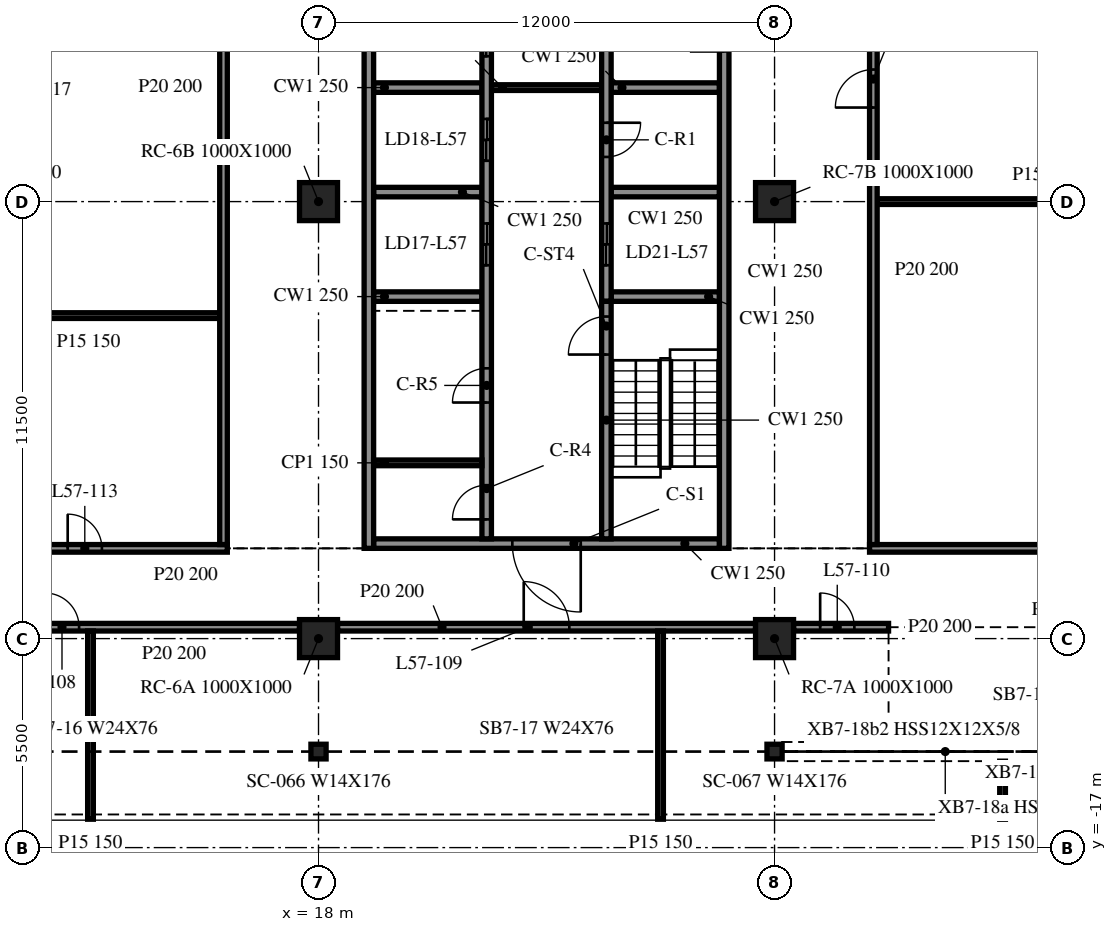
"""IFC4 building model, lengths in metres.
Left out: names, types, materials, properties, quantities, classifications, styles, units other than length and angle.
Written with IfcOpenShell. Run it as: python <this file> out.ifc"""

import sys

from ifc_helpers import new_model, si_unit, direction, frame, frame_2d, origin, origin_2d, place, context, subcontext, project, spatial, rectangle, i_section, extrude, element, fill, save


model = new_model("IFC4")
c1 = context("Model", 3, precision=1e-05, world=origin(), true_north=direction((0.0, 1.0)))
c2 = subcontext(c1, "Body", "Model", "MODEL_VIEW")
j1 = project(units=[si_unit("LENGTHUNIT", "METRE"), si_unit("PLANEANGLEUNIT", "RADIAN")], contexts=[c1])
p1 = place(None, origin())
s1 = spatial("IfcSite", under=j1, at=p1, CompositionType="ELEMENT")
p2 = place(p1, origin())
s2 = spatial("IfcBuilding", under=s1, at=p2, CompositionType="ELEMENT")
p3 = place(p2, frame((0.0, 0.0, 236.2)))
s3 = spatial("IfcBuildingStorey", under=s2, at=p3, CompositionType="ELEMENT", Elevation=236.2)
for number, where, z_axis, x_axis in (
    (1, (18.0, -11.5, -0.34), (0.0, 0.0, 1.0), (1.0, 0.0, 0.0)),
    (2, (18.0, 0.0, -0.34), (0.0, 0.0, 1.0), (1.0, 0.0, 0.0)),
    (3, (30.0, -11.5, -0.34), (0.0, 0.0, 1.0), (1.0, 0.0, 0.0)),
    (4, (30.0, 0.0, -0.34), (0.0, 0.0, 1.0), (1.0, 0.0, 0.0)),
):
    element("IfcColumn", number, at=place(p3, frame(where, z_axis=z_axis, x_axis=x_axis)), inside=s3, PredefinedType="COLUMN", context=c2, shape_type="SweptSolid", body=[
        extrude(rectangle(XDim=1.0, YDim=1.0, at=origin_2d()), origin(), (0.0, 0.0, 1.0), 3.8),
    ])
for number, where, z_axis, x_axis in (
    (5, (18.0, -14.473, -0.34), (0.0, 0.0, 1.0), (1.0, 0.0, 0.0)),
    (6, (30.0, -14.473, -0.34), (0.0, 0.0, 1.0), (1.0, 0.0, 0.0)),
):
    element("IfcColumn", number, at=place(p3, frame(where, z_axis=z_axis, x_axis=x_axis)), inside=s3, PredefinedType="COLUMN", context=c2, shape_type="SweptSolid", body=[
        extrude(i_section(OverallWidth=0.399, OverallDepth=0.386, WebThickness=0.021, FlangeThickness=0.033, at=origin_2d()), origin(), (0.0, 0.0, 1.0), 3.8),
    ])
p4 = place(p3, frame((19.325, 15.125, 0.0), z_axis=(0.0, 0.0, 1.0), x_axis=(0.0, -1.0, 0.0)))
e7 = element("IfcWall", 7, at=p4, inside=s3, PredefinedType="SOLIDWALL", context=c2, shape_type="SweptSolid", body=[
    extrude(rectangle(XDim=24.25, YDim=0.25, at=frame_2d((12.125, 0.0))), origin(), (0.0, 0.0, 1.0), 3.46),
])
p5 = place(p3, frame((28.675, -9.125, 0.0), z_axis=(0.0, 0.0, 1.0), x_axis=(0.0, 1.0, 0.0)))
e8 = element("IfcWall", 8, at=p5, inside=s3, PredefinedType="SOLIDWALL", context=c2, shape_type="SweptSolid", body=[
    extrude(rectangle(XDim=24.25, YDim=0.25, at=frame_2d((12.125, 0.0))), origin(), (0.0, 0.0, 1.0), 3.46),
])
p6 = place(p5, frame((13.075, 0.0, 0.0)))
e9 = element("IfcOpeningElement", 9, at=p6, cuts=e8, PredefinedType="OPENING", context=c2, shape_type="SweptSolid", body=[
    extrude(rectangle(XDim=0.9, YDim=2.1, at=frame_2d((0.45, 1.05))), frame((0.0, 0.135, 0.0), z_axis=(0.0, -1.0, 0.0), x_axis=(1.0, 0.0, 0.0)), (0.0, 0.0, 1.0), 0.27),
])
p7 = place(p5, frame((15.775, 0.0, 0.0)))
e10 = element("IfcOpeningElement", 10, at=p7, cuts=e8, PredefinedType="OPENING", context=c2, shape_type="SweptSolid", body=[
    extrude(rectangle(XDim=0.9, YDim=2.1, at=frame_2d((0.45, 1.05))), frame((0.0, 0.135, 0.0), z_axis=(0.0, -1.0, 0.0), x_axis=(1.0, 0.0, 0.0)), (0.0, 0.0, 1.0), 0.27),
])
p8 = place(p5, frame((19.225, 0.0, 0.0)))
e11 = element("IfcOpeningElement", 11, at=p8, cuts=e8, PredefinedType="OPENING", context=c2, shape_type="SweptSolid", body=[
    extrude(rectangle(XDim=0.9, YDim=2.1, at=frame_2d((0.45, 1.05))), frame((0.0, 0.135, 0.0), z_axis=(0.0, -1.0, 0.0), x_axis=(1.0, 0.0, 0.0)), (0.0, 0.0, 1.0), 0.27),
])
p9 = place(p5, frame((22.587, 0.0, 0.0)))
e12 = element("IfcOpeningElement", 12, at=p9, cuts=e8, PredefinedType="OPENING", context=c2, shape_type="SweptSolid", body=[
    extrude(rectangle(XDim=0.9, YDim=2.1, at=frame_2d((0.45, 1.05))), frame((0.0, 0.135, 0.0), z_axis=(0.0, -1.0, 0.0), x_axis=(1.0, 0.0, 0.0)), (0.0, 0.0, 1.0), 0.27),
])
p10 = place(p3, frame((28.55, -9.0, 0.0), z_axis=(0.0, 0.0, 1.0), x_axis=(-1.0, 0.0, 0.0)))
e13 = element("IfcWall", 13, at=p10, inside=s3, PredefinedType="SOLIDWALL", context=c2, shape_type="SweptSolid", body=[
    extrude(rectangle(XDim=9.1, YDim=0.25, at=frame_2d((4.55, 0.0))), origin(), (0.0, 0.0, 1.0), 3.46),
])
p11 = place(p10, frame((3.65, 0.0, 0.0)))
e14 = element("IfcOpeningElement", 14, at=p11, cuts=e13, PredefinedType="OPENING", context=c2, shape_type="SweptSolid", body=[
    extrude(rectangle(XDim=1.8, YDim=2.1, at=frame_2d((0.9, 1.05))), frame((0.0, 0.135, 0.0), z_axis=(0.0, -1.0, 0.0), x_axis=(1.0, 0.0, 0.0)), (0.0, 0.0, 1.0), 0.27),
])
p12 = place(p3, frame((22.425, -8.875, 0.0), z_axis=(0.0, 0.0, 1.0), x_axis=(0.0, 1.0, 0.0)))
e15 = element("IfcWall", 15, at=p12, inside=s3, PredefinedType="SOLIDWALL", context=c2, shape_type="SweptSolid", body=[
    extrude(rectangle(XDim=17.5, YDim=0.25, at=frame_2d((8.75, 0.0))), origin(), (0.0, 0.0, 1.0), 3.46),
])
p13 = place(p12, frame((7.2, 0.0, 0.0)))
e16 = element("IfcOpeningElement", 16, at=p13, cuts=e15, PredefinedType="OPENING", context=c2, shape_type="SweptSolid", body=[
    extrude(rectangle(XDim=1.1, YDim=2.1, at=frame_2d((0.55, 1.05))), frame((0.0, 0.135, 0.0), z_axis=(0.0, -1.0, 0.0), x_axis=(1.0, 0.0, 0.0)), (0.0, 0.0, 1.0), 0.27),
])
p14 = place(p12, frame((9.95, 0.0, 0.0)))
e17 = element("IfcOpeningElement", 17, at=p14, cuts=e15, PredefinedType="OPENING", context=c2, shape_type="SweptSolid", body=[
    extrude(rectangle(XDim=1.1, YDim=2.1, at=frame_2d((0.55, 1.05))), frame((0.0, 0.135, 0.0), z_axis=(0.0, -1.0, 0.0), x_axis=(1.0, 0.0, 0.0)), (0.0, 0.0, 1.0), 0.27),
])
p15 = place(p12, frame((12.7, 0.0, 0.0)))
e18 = element("IfcOpeningElement", 18, at=p15, cuts=e15, PredefinedType="OPENING", context=c2, shape_type="SweptSolid", body=[
    extrude(rectangle(XDim=1.1, YDim=2.1, at=frame_2d((0.55, 1.05))), frame((0.0, 0.135, 0.0), z_axis=(0.0, -1.0, 0.0), x_axis=(1.0, 0.0, 0.0)), (0.0, 0.0, 1.0), 0.27),
])
p16 = place(p12, frame((15.45, 0.0, 0.0)))
e19 = element("IfcOpeningElement", 19, at=p16, cuts=e15, PredefinedType="OPENING", context=c2, shape_type="SweptSolid", body=[
    extrude(rectangle(XDim=1.1, YDim=2.1, at=frame_2d((0.55, 1.05))), frame((0.0, 0.135, 0.0), z_axis=(0.0, -1.0, 0.0), x_axis=(1.0, 0.0, 0.0)), (0.0, 0.0, 1.0), 0.27),
])
p17 = place(p12, frame((0.512, 0.0, 0.0)))
e20 = element("IfcOpeningElement", 20, at=p17, cuts=e15, PredefinedType="OPENING", context=c2, shape_type="SweptSolid", body=[
    extrude(rectangle(XDim=0.9, YDim=2.1, at=frame_2d((0.45, 1.05))), frame((0.0, 0.135, 0.0), z_axis=(0.0, -1.0, 0.0), x_axis=(1.0, 0.0, 0.0)), (0.0, 0.0, 1.0), 0.27),
])
p18 = place(p12, frame((3.587, 0.0, 0.0)))
e21 = element("IfcOpeningElement", 21, at=p18, cuts=e15, PredefinedType="OPENING", context=c2, shape_type="SweptSolid", body=[
    extrude(rectangle(XDim=0.9, YDim=2.1, at=frame_2d((0.45, 1.05))), frame((0.0, 0.135, 0.0), z_axis=(0.0, -1.0, 0.0), x_axis=(1.0, 0.0, 0.0)), (0.0, 0.0, 1.0), 0.27),
])
p19 = place(p3, frame((25.575, -8.875, 0.0), z_axis=(0.0, 0.0, 1.0), x_axis=(0.0, 1.0, 0.0)))
e22 = element("IfcWall", 22, at=p19, inside=s3, PredefinedType="SOLIDWALL", context=c2, shape_type="SweptSolid", body=[
    extrude(rectangle(XDim=6.25, YDim=0.25, at=frame_2d((3.125, 0.0))), origin(), (0.0, 0.0, 1.0), 3.46),
])
p20 = place(p19, frame((4.85, 0.0, 0.0)))
e23 = element("IfcOpeningElement", 23, at=p20, cuts=e22, PredefinedType="OPENING", context=c2, shape_type="SweptSolid", body=[
    extrude(rectangle(XDim=1.0, YDim=2.1, at=frame_2d((0.5, 1.05))), frame((0.0, 0.135, 0.0), z_axis=(0.0, -1.0, 0.0), x_axis=(1.0, 0.0, 0.0)), (0.0, 0.0, 1.0), 0.27),
])
p21 = place(p3, frame((25.575, 14.875, 0.0), z_axis=(0.0, 0.0, 1.0), x_axis=(0.0, -1.0, 0.0)))
e24 = element("IfcWall", 24, at=p21, inside=s3, PredefinedType="SOLIDWALL", context=c2, shape_type="SweptSolid", body=[
    extrude(rectangle(XDim=17.5, YDim=0.25, at=frame_2d((8.75, 0.0))), origin(), (0.0, 0.0, 1.0), 3.46),
])
p22 = place(p21, frame((15.45, 0.0, 0.0)))
e25 = element("IfcOpeningElement", 25, at=p22, cuts=e24, PredefinedType="OPENING", context=c2, shape_type="SweptSolid", body=[
    extrude(rectangle(XDim=1.1, YDim=2.1, at=frame_2d((0.55, 1.05))), frame((0.0, 0.135, 0.0), z_axis=(0.0, -1.0, 0.0), x_axis=(1.0, 0.0, 0.0)), (0.0, 0.0, 1.0), 0.27),
])
p23 = place(p21, frame((12.8, 0.0, 0.0)))
e26 = element("IfcOpeningElement", 26, at=p23, cuts=e24, PredefinedType="OPENING", context=c2, shape_type="SweptSolid", body=[
    extrude(rectangle(XDim=0.9, YDim=2.1, at=frame_2d((0.45, 1.05))), frame((0.0, 0.135, 0.0), z_axis=(0.0, -1.0, 0.0), x_axis=(1.0, 0.0, 0.0)), (0.0, 0.0, 1.0), 0.27),
])
for number, where, z_axis, x_axis in (
    (27, (19.45, -2.5, 0.0), (0.0, 0.0, 1.0), (1.0, 0.0, 0.0)),
    (28, (19.45, 0.25, 0.0), (0.0, 0.0, 1.0), (1.0, 0.0, 0.0)),
    (29, (19.45, 3.0, 0.0), (0.0, 0.0, 1.0), (1.0, 0.0, 0.0)),
    (30, (25.7, -2.5, 0.0), (0.0, 0.0, 1.0), (1.0, 0.0, 0.0)),
    (31, (25.7, 0.25, 0.0), (0.0, 0.0, 1.0), (1.0, 0.0, 0.0)),
    (32, (25.7, 3.0, 0.0), (0.0, 0.0, 1.0), (1.0, 0.0, 0.0)),
):
    element("IfcWall", number, at=place(p3, frame(where, z_axis=z_axis, x_axis=x_axis)), inside=s3, PredefinedType="SOLIDWALL", context=c2, shape_type="SweptSolid", body=[
        extrude(rectangle(XDim=2.85, YDim=0.25, at=frame_2d((1.425, 0.0))), origin(), (0.0, 0.0, 1.0), 3.46),
    ])
p24 = place(p3, frame((22.55, 3.0, 0.0), z_axis=(0.0, 0.0, 1.0), x_axis=(1.0, 0.0, 0.0)))
e33 = element("IfcWall", 33, at=p24, inside=s3, PredefinedType="PARTITIONING", context=c2, shape_type="SweptSolid", body=[
    extrude(rectangle(XDim=2.9, YDim=0.15, at=frame_2d((1.45, 0.0))), origin(), (0.0, 0.0, 1.0), 3.46),
])
p25 = place(p3, frame((19.45, -6.875, 0.0), z_axis=(0.0, 0.0, 1.0), x_axis=(1.0, 0.0, 0.0)))
e34 = element("IfcWall", 34, at=p25, inside=s3, PredefinedType="PARTITIONING", context=c2, shape_type="SweptSolid", body=[
    extrude(rectangle(XDim=2.85, YDim=0.15, at=frame_2d((1.425, 0.0))), origin(), (0.0, 0.0, 1.0), 3.46),
])
p26 = place(p3, frame((6.5, -11.2, 0.0), z_axis=(0.0, 0.0, 1.0), x_axis=(1.0, 0.0, 0.0)))
e35 = element("IfcWall", 35, at=p26, inside=s3, PredefinedType="PARTITIONING", context=c2, shape_type="SweptSolid", body=[
    extrude(rectangle(XDim=11.0, YDim=0.2, at=frame_2d((5.5, 0.0))), origin(), (0.0, 0.0, 1.0), 3.46),
])
p27 = place(p26, frame((1.3, 0.0, 0.0)))
e36 = element("IfcOpeningElement", 36, at=p27, cuts=e35, PredefinedType="OPENING", context=c2, shape_type="SweptSolid", body=[
    extrude(rectangle(XDim=0.9, YDim=2.1, at=frame_2d((0.45, 1.05))), frame((0.0, 0.11, 0.0), z_axis=(0.0, -1.0, 0.0), x_axis=(1.0, 0.0, 0.0)), (0.0, 0.0, 1.0), 0.22),
])
p28 = place(p26, frame((4.3, 0.0, 0.0)))
e37 = element("IfcOpeningElement", 37, at=p28, cuts=e35, PredefinedType="OPENING", context=c2, shape_type="SweptSolid", body=[
    extrude(rectangle(XDim=0.9, YDim=2.1, at=frame_2d((0.45, 1.05))), frame((0.0, 0.11, 0.0), z_axis=(0.0, -1.0, 0.0), x_axis=(1.0, 0.0, 0.0)), (0.0, 0.0, 1.0), 0.22),
])
p29 = place(p3, frame((18.5, -11.2, 0.0), z_axis=(0.0, 0.0, 1.0), x_axis=(1.0, 0.0, 0.0)))
e38 = element("IfcWall", 38, at=p29, inside=s3, PredefinedType="PARTITIONING", context=c2, shape_type="SweptSolid", body=[
    extrude(rectangle(XDim=11.0, YDim=0.2, at=frame_2d((5.5, 0.0))), origin(), (0.0, 0.0, 1.0), 3.46),
])
p30 = place(p29, frame((4.9, 0.0, 0.0)))
e39 = element("IfcOpeningElement", 39, at=p30, cuts=e38, PredefinedType="OPENING", context=c2, shape_type="SweptSolid", body=[
    extrude(rectangle(XDim=1.2, YDim=2.1, at=frame_2d((0.6, 1.05))), frame((0.0, 0.11, 0.0), z_axis=(0.0, -1.0, 0.0), x_axis=(1.0, 0.0, 0.0)), (0.0, 0.0, 1.0), 0.22),
])
p31 = place(p3, frame((30.5, -11.2, 0.0), z_axis=(0.0, 0.0, 1.0), x_axis=(1.0, 0.0, 0.0)))
e40 = element("IfcWall", 40, at=p31, inside=s3, PredefinedType="PARTITIONING", context=c2, shape_type="SweptSolid", body=[
    extrude(rectangle(XDim=2.5, YDim=0.2, at=frame_2d((1.25, 0.0))), origin(), (0.0, 0.0, 1.0), 3.46),
])
p32 = place(p31, frame((0.7, 0.0, 0.0)))
e41 = element("IfcOpeningElement", 41, at=p32, cuts=e40, PredefinedType="OPENING", context=c2, shape_type="SweptSolid", body=[
    extrude(rectangle(XDim=0.9, YDim=2.1, at=frame_2d((0.45, 1.05))), frame((0.0, 0.11, 0.0), z_axis=(0.0, -1.0, 0.0), x_axis=(1.0, 0.0, 0.0)), (0.0, 0.0, 1.0), 0.22),
])
p33 = place(p3, frame((8.3, -9.125, 0.0), z_axis=(0.0, 0.0, 1.0), x_axis=(1.0, 0.0, 0.0)))
e42 = element("IfcWall", 42, at=p33, inside=s3, PredefinedType="PARTITIONING", context=c2, shape_type="SweptSolid", body=[
    extrude(rectangle(XDim=7.3, YDim=0.2, at=frame_2d((3.65, 0.0))), origin(), (0.0, 0.0, 1.0), 3.46),
])
p34 = place(p33, frame((3.1, 0.0, 0.0)))
e43 = element("IfcOpeningElement", 43, at=p34, cuts=e42, PredefinedType="OPENING", context=c2, shape_type="SweptSolid", body=[
    extrude(rectangle(XDim=0.9, YDim=2.1, at=frame_2d((0.45, 1.05))), frame((0.0, 0.11, 0.0), z_axis=(0.0, -1.0, 0.0), x_axis=(1.0, 0.0, 0.0)), (0.0, 0.0, 1.0), 0.22),
])
p35 = place(p3, frame((32.5, -9.125, 0.0), z_axis=(0.0, 0.0, 1.0), x_axis=(1.0, 0.0, 0.0)))
e44 = element("IfcWall", 44, at=p35, inside=s3, PredefinedType="PARTITIONING", context=c2, shape_type="SweptSolid", body=[
    extrude(rectangle(XDim=21.475, YDim=0.2, at=frame_2d((10.738, 0.0))), origin(), (0.0, 0.0, 1.0), 3.46),
])
p36 = place(p35, frame((10.1, 0.0, 0.0)))
e45 = element("IfcOpeningElement", 45, at=p36, cuts=e44, PredefinedType="OPENING", context=c2, shape_type="SweptSolid", body=[
    extrude(rectangle(XDim=1.0, YDim=2.1, at=frame_2d((0.5, 1.05))), frame((0.0, 0.11, 0.0), z_axis=(0.0, -1.0, 0.0), x_axis=(1.0, 0.0, 0.0)), (0.0, 0.0, 1.0), 0.22),
])
p37 = place(p3, frame((8.5, -3.0, 0.0), z_axis=(0.0, 0.0, 1.0), x_axis=(1.0, 0.0, 0.0)))
e46 = element("IfcWall", 46, at=p37, inside=s3, PredefinedType="PARTITIONING", context=c2, shape_type="SweptSolid", body=[
    extrude(rectangle(XDim=6.9, YDim=0.15, at=frame_2d((3.45, 0.0))), origin(), (0.0, 0.0, 1.0), 3.46),
])
p38 = place(p3, frame((32.7, 0.0, 0.0), z_axis=(0.0, 0.0, 1.0), x_axis=(1.0, 0.0, 0.0)))
e47 = element("IfcWall", 47, at=p38, inside=s3, PredefinedType="PARTITIONING", context=c2, shape_type="SweptSolid", body=[
    extrude(rectangle(XDim=8.8, YDim=0.15, at=frame_2d((4.4, 0.0))), origin(), (0.0, 0.0, 1.0), 3.46),
])
p39 = place(p3, frame((12.0, -16.253, 0.0), z_axis=(0.0, 0.0, 1.0), x_axis=(0.0, 1.0, 0.0)))
e48 = element("IfcWall", 48, at=p39, inside=s3, PredefinedType="PARTITIONING", context=c2, shape_type="SweptSolid", body=[
    extrude(rectangle(XDim=4.953, YDim=0.15, at=frame_2d((2.477, 0.0))), origin(), (0.0, 0.0, 1.0), 3.46),
])
p40 = place(p3, frame((15.5, -9.025, 0.0), z_axis=(0.0, 0.0, 1.0), x_axis=(0.0, 1.0, 0.0)))
e49 = element("IfcWall", 49, at=p40, inside=s3, PredefinedType="PARTITIONING", context=c2, shape_type="SweptSolid", body=[
    extrude(rectangle(XDim=24.05, YDim=0.2, at=frame_2d((12.025, 0.0))), origin(), (0.0, 0.0, 1.0), 3.46),
])
p41 = place(p3, frame((27.0, -16.253, 0.0), z_axis=(0.0, 0.0, 1.0), x_axis=(0.0, 1.0, 0.0)))
e50 = element("IfcWall", 50, at=p41, inside=s3, PredefinedType="PARTITIONING", context=c2, shape_type="SweptSolid", body=[
    extrude(rectangle(XDim=4.953, YDim=0.15, at=frame_2d((2.477, 0.0))), origin(), (0.0, 0.0, 1.0), 3.46),
])
p42 = place(p3, frame((32.6, -9.025, 0.0), z_axis=(0.0, 0.0, 1.0), x_axis=(0.0, 1.0, 0.0)))
e51 = element("IfcWall", 51, at=p42, inside=s3, PredefinedType="PARTITIONING", context=c2, shape_type="SweptSolid", body=[
    extrude(rectangle(XDim=24.05, YDim=0.2, at=frame_2d((12.025, 0.0))), origin(), (0.0, 0.0, 1.0), 3.46),
])
p43 = place(p42, frame((11.5, 0.0, 0.0)))
e52 = element("IfcOpeningElement", 52, at=p43, cuts=e51, PredefinedType="OPENING", context=c2, shape_type="SweptSolid", body=[
    extrude(rectangle(XDim=1.0, YDim=2.1, at=frame_2d((0.5, 1.05))), frame((0.0, 0.11, 0.0), z_axis=(0.0, -1.0, 0.0), x_axis=(1.0, 0.0, 0.0)), (0.0, 0.0, 1.0), 0.22),
])
p44 = place(p3, frame((36.0, -16.253, 0.0), z_axis=(0.0, 0.0, 1.0), x_axis=(0.0, 1.0, 0.0)))
e53 = element("IfcWall", 53, at=p44, inside=s3, PredefinedType="PARTITIONING", context=c2, shape_type="SweptSolid", body=[
    extrude(rectangle(XDim=1.528, YDim=0.15, at=frame_2d((0.764, 0.0))), origin(), (0.0, 0.0, 1.0), 3.46),
])
p45 = place(p11, origin())
e54 = element("IfcDoor", 54, at=p45, inside=s3, OperationType="DOUBLE_DOOR_SINGLE_SWING", PredefinedType="DOOR", context=c2, shape_type="SweptSolid", body=[
    extrude(rectangle(XDim=1.8, YDim=2.1, at=frame_2d((0.9, 1.05))), frame((0.0, 0.025, 0.0), z_axis=(0.0, -1.0, 0.0), x_axis=(1.0, 0.0, 0.0)), (0.0, 0.0, 1.0), 0.05),
])
fill(e14, e54)
p46 = place(p22, origin())
e55 = element("IfcDoor", 55, at=p46, inside=s3, OperationType="DOUBLE_DOOR_SLIDING", PredefinedType="DOOR", context=c2, shape_type="SweptSolid", body=[
    extrude(rectangle(XDim=1.1, YDim=2.1, at=frame_2d((0.55, 1.05))), frame((0.0, 0.025, 0.0), z_axis=(0.0, -1.0, 0.0), x_axis=(1.0, 0.0, 0.0)), (0.0, 0.0, 1.0), 0.05),
])
fill(e25, e55)
p47 = place(p13, origin())
e56 = element("IfcDoor", 56, at=p47, inside=s3, OperationType="DOUBLE_DOOR_SLIDING", PredefinedType="DOOR", context=c2, shape_type="SweptSolid", body=[
    extrude(rectangle(XDim=1.1, YDim=2.1, at=frame_2d((0.55, 1.05))), frame((0.0, 0.025, 0.0), z_axis=(0.0, -1.0, 0.0), x_axis=(1.0, 0.0, 0.0)), (0.0, 0.0, 1.0), 0.05),
])
fill(e16, e56)
p48 = place(p14, origin())
e57 = element("IfcDoor", 57, at=p48, inside=s3, OperationType="DOUBLE_DOOR_SLIDING", PredefinedType="DOOR", context=c2, shape_type="SweptSolid", body=[
    extrude(rectangle(XDim=1.1, YDim=2.1, at=frame_2d((0.55, 1.05))), frame((0.0, 0.025, 0.0), z_axis=(0.0, -1.0, 0.0), x_axis=(1.0, 0.0, 0.0)), (0.0, 0.0, 1.0), 0.05),
])
fill(e17, e57)
p49 = place(p15, origin())
e58 = element("IfcDoor", 58, at=p49, inside=s3, OperationType="DOUBLE_DOOR_SLIDING", PredefinedType="DOOR", context=c2, shape_type="SweptSolid", body=[
    extrude(rectangle(XDim=1.1, YDim=2.1, at=frame_2d((0.55, 1.05))), frame((0.0, 0.025, 0.0), z_axis=(0.0, -1.0, 0.0), x_axis=(1.0, 0.0, 0.0)), (0.0, 0.0, 1.0), 0.05),
])
fill(e18, e58)
p50 = place(p23, origin())
e59 = element("IfcDoor", 59, at=p50, inside=s3, OperationType="SINGLE_SWING_LEFT", PredefinedType="DOOR", context=c2, shape_type="SweptSolid", body=[
    extrude(rectangle(XDim=0.9, YDim=2.1, at=frame_2d((0.45, 1.05))), frame((0.0, 0.025, 0.0), z_axis=(0.0, -1.0, 0.0), x_axis=(1.0, 0.0, 0.0)), (0.0, 0.0, 1.0), 0.05),
])
fill(e26, e59)
p51 = place(p17, origin())
e60 = element("IfcDoor", 60, at=p51, inside=s3, OperationType="SINGLE_SWING_RIGHT", PredefinedType="DOOR", context=c2, shape_type="SweptSolid", body=[
    extrude(rectangle(XDim=0.9, YDim=2.1, at=frame_2d((0.45, 1.05))), frame((0.0, 0.025, 0.0), z_axis=(0.0, -1.0, 0.0), x_axis=(1.0, 0.0, 0.0)), (0.0, 0.0, 1.0), 0.05),
])
fill(e20, e60)
p52 = place(p18, origin())
e61 = element("IfcDoor", 61, at=p52, inside=s3, OperationType="SINGLE_SWING_LEFT", PredefinedType="DOOR", context=c2, shape_type="SweptSolid", body=[
    extrude(rectangle(XDim=0.9, YDim=2.1, at=frame_2d((0.45, 1.05))), frame((0.0, 0.025, 0.0), z_axis=(0.0, -1.0, 0.0), x_axis=(1.0, 0.0, 0.0)), (0.0, 0.0, 1.0), 0.05),
])
fill(e21, e61)
p53 = place(p20, origin())
e62 = element("IfcDoor", 62, at=p53, inside=s3, OperationType="SINGLE_SWING_LEFT", PredefinedType="DOOR", context=c2, shape_type="SweptSolid", body=[
    extrude(rectangle(XDim=1.0, YDim=2.1, at=frame_2d((0.5, 1.05))), frame((0.0, 0.025, 0.0), z_axis=(0.0, -1.0, 0.0), x_axis=(1.0, 0.0, 0.0)), (0.0, 0.0, 1.0), 0.05),
])
fill(e23, e62)
p54 = place(p28, origin())
e63 = element("IfcDoor", 63, at=p54, inside=s3, OperationType="SINGLE_SWING_RIGHT", PredefinedType="DOOR", context=c2, shape_type="SweptSolid", body=[
    extrude(rectangle(XDim=0.9, YDim=2.1, at=frame_2d((0.45, 1.05))), frame((0.0, 0.025, 0.0), z_axis=(0.0, -1.0, 0.0), x_axis=(1.0, 0.0, 0.0)), (0.0, 0.0, 1.0), 0.05),
])
fill(e37, e63)
p55 = place(p30, origin())
e64 = element("IfcDoor", 64, at=p55, inside=s3, OperationType="SINGLE_SWING_LEFT", PredefinedType="DOOR", context=c2, shape_type="SweptSolid", body=[
    extrude(rectangle(XDim=1.2, YDim=2.1, at=frame_2d((0.6, 1.05))), frame((0.0, 0.025, 0.0), z_axis=(0.0, -1.0, 0.0), x_axis=(1.0, 0.0, 0.0)), (0.0, 0.0, 1.0), 0.05),
])
fill(e39, e64)
p56 = place(p32, origin())
e65 = element("IfcDoor", 65, at=p56, inside=s3, OperationType="SINGLE_SWING_RIGHT", PredefinedType="DOOR", context=c2, shape_type="SweptSolid", body=[
    extrude(rectangle(XDim=0.9, YDim=2.1, at=frame_2d((0.45, 1.05))), frame((0.0, 0.025, 0.0), z_axis=(0.0, -1.0, 0.0), x_axis=(1.0, 0.0, 0.0)), (0.0, 0.0, 1.0), 0.05),
])
fill(e41, e65)
p57 = place(p34, origin())
e66 = element("IfcDoor", 66, at=p57, inside=s3, OperationType="SINGLE_SWING_LEFT", PredefinedType="DOOR", context=c2, shape_type="SweptSolid", body=[
    extrude(rectangle(XDim=0.9, YDim=2.1, at=frame_2d((0.45, 1.05))), frame((0.0, 0.025, 0.0), z_axis=(0.0, -1.0, 0.0), x_axis=(1.0, 0.0, 0.0)), (0.0, 0.0, 1.0), 0.05),
])
fill(e43, e66)
p58 = place(p43, origin())
e67 = element("IfcDoor", 67, at=p58, inside=s3, OperationType="SINGLE_SWING_RIGHT", PredefinedType="DOOR", context=c2, shape_type="SweptSolid", body=[
    extrude(rectangle(XDim=1.0, YDim=2.1, at=frame_2d((0.5, 1.05))), frame((0.0, 0.025, 0.0), z_axis=(0.0, -1.0, 0.0), x_axis=(1.0, 0.0, 0.0)), (0.0, 0.0, 1.0), 0.05),
])
fill(e52, e67)
save(model, sys.argv[1])
